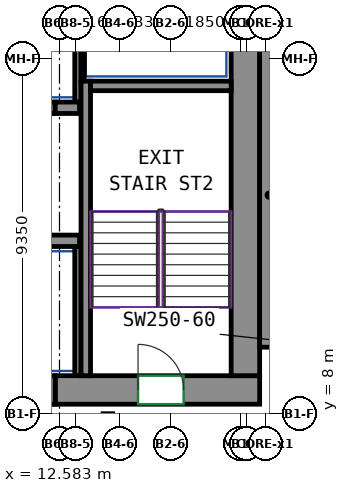
"""IFC4 building model, lengths in metres.
Left out: names, types, materials, properties, quantities, classifications, styles, units other than length and angle.
Written with IfcOpenShell. Run it as: python <this file> out.ifc"""

import sys

from ifc_helpers import new_model, si_unit, direction, frame, frame_2d, origin, place, context, subcontext, project, spatial, rectangle, extrude, source, transform, mapped, element, fill, save


model = new_model("IFC4")
c1 = context("Model", 3, precision=1e-05, world=origin(), true_north=direction((0.0, 1.0)))
c2 = subcontext(c1, "Body", "Model", "MODEL_VIEW")
j1 = project(units=[si_unit("LENGTHUNIT", "METRE"), si_unit("PLANEANGLEUNIT", "RADIAN")], contexts=[c1])
p1 = place(None, origin())
s1 = spatial("IfcSite", under=j1, at=p1, CompositionType="ELEMENT")
p2 = place(p1, origin())
s2 = spatial("IfcBuilding", under=s1, at=p2, CompositionType="ELEMENT")
p3 = place(p2, frame((0.0, 0.0, 199.9)))
s3 = spatial("IfcBuildingStorey", under=s2, at=p3, CompositionType="ELEMENT", Elevation=199.9)
m1 = source(origin(), c2, "Body", "SweptSolid", [
    extrude(rectangle(XDim=5.38, YDim=0.75, at=frame_2d((2.69, 0.0))), origin(), (0.0, 0.0, 1.0), 3.12),
])
p4 = place(p3, frame((12.47, 8.625, 0.0), z_axis=(0.0, 0.0, 1.0), x_axis=(1.0, 0.0, 0.0)))
e1 = element("IfcWall", 1, at=p4, inside=s3, PredefinedType="SHEAR", context=c2, shape_type="MappedRepresentation", body=[
    mapped(m1, transform((0.0, 0.0, 0.0))),
])
p5 = place(p4, frame((2.18, 0.0, 0.0)))
e2 = element("IfcOpeningElement", 2, at=p5, cuts=e1, PredefinedType="OPENING", context=c2, shape_type="SweptSolid", body=[
    extrude(rectangle(XDim=1.2, YDim=2.1, at=frame_2d((0.6, 1.05))), frame((0.0, 0.385, 0.0), z_axis=(0.0, -1.0, 0.0), x_axis=(1.0, 0.0, 0.0)), (0.0, 0.0, 1.0), 0.77),
])
m2 = source(origin(), c2, "Body", "SweptSolid", [
    extrude(rectangle(XDim=12.0, YDim=0.75, at=frame_2d((6.0, 0.0))), origin(), (0.0, 0.0, 1.0), 3.12),
])
p6 = place(p3, frame((17.475, 9.0, 0.0), z_axis=(0.0, 0.0, 1.0), x_axis=(0.0, 1.0, 0.0)))
e3 = element("IfcWall", 3, at=p6, inside=s3, PredefinedType="SHEAR", context=c2, shape_type="MappedRepresentation", body=[
    mapped(m2, transform((0.0, 0.0, 0.0))),
])
m3 = source(origin(), c2, "Body", "SweptSolid", [
    extrude(rectangle(XDim=7.75, YDim=0.25, at=frame_2d((3.875, 0.0))), origin(), (0.0, 0.0, 1.0), 3.12),
])
p7 = place(p3, frame((13.275, 9.0, 0.0), z_axis=(0.0, 0.0, 1.0), x_axis=(0.0, 1.0, 0.0)))
e4 = element("IfcWall", 4, at=p7, inside=s3, PredefinedType="SHEAR", context=c2, shape_type="MappedRepresentation", body=[
    mapped(m3, transform((0.0, 0.0, 0.0))),
])
m4 = source(origin(), c2, "Body", "SweptSolid", [
    extrude(rectangle(XDim=3.7, YDim=0.25, at=frame_2d((1.85, 0.0))), origin(), (0.0, 0.0, 1.0), 3.12),
])
p8 = place(p3, frame((13.4, 16.625, 0.0), z_axis=(0.0, 0.0, 1.0), x_axis=(1.0, 0.0, 0.0)))
e5 = element("IfcWall", 5, at=p8, inside=s3, PredefinedType="SHEAR", context=c2, shape_type="MappedRepresentation", body=[
    mapped(m4, transform((0.0, 0.0, 0.0))),
])
m5 = source(origin(), c2, "Body", "SweptSolid", [
    extrude(rectangle(XDim=8.0, YDim=0.5, at=frame_2d((4.0, 0.0))), origin(), (0.0, 0.0, 1.0), 3.12),
])
p9 = place(p3, frame((18.1, 9.75, 0.0), z_axis=(0.0, 0.0, 1.0), x_axis=(0.0, 1.0, 0.0)))
e6 = element("IfcWall", 6, at=p9, inside=s3, PredefinedType="SHEAR", context=c2, shape_type="MappedRepresentation", body=[
    mapped(m5, transform((0.0, 0.0, 0.0))),
])
m6 = source(origin(), c2, "Body", "SweptSolid", [
    extrude(rectangle(XDim=2.82, YDim=0.3, at=frame_2d((1.41, 0.0))), origin(), (0.0, 0.0, 1.0), 3.12),
])
p10 = place(p3, frame((10.29, 12.55, 0.0), z_axis=(0.0, 0.0, 1.0), x_axis=(1.0, 0.0, 0.0)))
e7 = element("IfcWall", 7, at=p10, inside=s3, PredefinedType="SHEAR", context=c2, shape_type="MappedRepresentation", body=[
    mapped(m6, transform((0.0, 0.0, 0.0))),
])
m7 = source(origin(), c2, "Body", "SweptSolid", [
    extrude(rectangle(XDim=0.64, YDim=0.3, at=frame_2d((0.32, 0.0))), origin(), (0.0, 0.0, 1.0), 3.12),
])
p11 = place(p3, frame((12.47, 16.05, 0.0), z_axis=(0.0, 0.0, 1.0), x_axis=(1.0, 0.0, 0.0)))
e8 = element("IfcWall", 8, at=p11, inside=s3, PredefinedType="SHEAR", context=c2, shape_type="MappedRepresentation", body=[
    mapped(m7, transform((0.0, 0.0, 0.0))),
])
m8 = source(origin(), c2, "Body", "SweptSolid", [
    extrude(rectangle(XDim=1.4, YDim=0.3, at=frame_2d((0.7, 0.0))), origin(), (0.0, 0.0, 1.0), 3.12),
])
p12 = place(p3, frame((11.07, 16.05, 0.0), z_axis=(0.0, 0.0, 1.0), x_axis=(1.0, 0.0, 0.0)))
e9 = element("IfcWall", 9, at=p12, inside=s3, PredefinedType="PARTITIONING", context=c2, shape_type="MappedRepresentation", body=[
    mapped(m8, transform((0.0, 0.0, 0.0))),
])
p13 = place(p12, frame((0.15, 0.0, 0.0)))
e10 = element("IfcOpeningElement", 10, at=p13, cuts=e9, PredefinedType="OPENING", context=c2, shape_type="SweptSolid", body=[
    extrude(rectangle(XDim=1.1, YDim=2.1, at=frame_2d((0.55, 1.05))), frame((0.0, 0.16, 0.0), z_axis=(0.0, -1.0, 0.0), x_axis=(1.0, 0.0, 0.0)), (0.0, 0.0, 1.0), 0.32),
])
m9 = source(origin(), c2, "Body", "SweptSolid", [
    extrude(rectangle(XDim=3.275, YDim=0.165, at=frame_2d((1.638, 0.0))), origin(), (0.0, 0.0, 1.0), 3.12),
])
p14 = place(p3, frame((13.067, 16.2, 0.0), z_axis=(0.0, 0.0, 1.0), x_axis=(0.0, 1.0, 0.0)))
e11 = element("IfcWall", 11, at=p14, inside=s3, PredefinedType="PARTITIONING", context=c2, shape_type="MappedRepresentation", body=[
    mapped(m9, transform((0.0, 0.0, 0.0))),
])
m10 = source(origin(), c2, "Body", "SweptSolid", [
    extrude(rectangle(XDim=2.725, YDim=0.085, at=frame_2d((1.363, 0.0))), origin(), (0.0, 0.0, 1.0), 3.12),
])
p15 = place(p3, frame((13.192, 16.75, 0.0), z_axis=(0.0, 0.0, 1.0), x_axis=(0.0, 1.0, 0.0)))
e12 = element("IfcWall", 12, at=p15, inside=s3, PredefinedType="PARTITIONING", context=c2, shape_type="MappedRepresentation", body=[
    mapped(m10, transform((0.0, 0.0, 0.0))),
])
m11 = source(origin(), c2, "Body", "SweptSolid", [
    extrude(rectangle(XDim=3.4, YDim=0.165, at=frame_2d((1.7, 0.0))), origin(), (0.0, 0.0, 1.0), 3.12),
])
p16 = place(p3, frame((13.067, 9.0, 0.0), z_axis=(0.0, 0.0, 1.0), x_axis=(0.0, 1.0, 0.0)))
e13 = element("IfcWall", 13, at=p16, inside=s3, PredefinedType="PARTITIONING", context=c2, shape_type="MappedRepresentation", body=[
    mapped(m11, transform((0.0, 0.0, 0.0))),
])
m12 = source(origin(), c2, "Body", "SweptSolid", [
    extrude(rectangle(XDim=1.4, YDim=0.75, at=frame_2d((0.7, 0.0))), origin(), (0.0, 0.0, 1.0), 2.7),
])
p17 = place(p3, frame((11.07, 8.625, 0.0), z_axis=(0.0, 0.0, 1.0), x_axis=(1.0, 0.0, 0.0)))
e14 = element("IfcWall", 14, at=p17, inside=s3, PredefinedType="PARTITIONING", context=c2, shape_type="MappedRepresentation", body=[
    mapped(m12, transform((0.0, 0.0, 0.0))),
])
p18 = place(p17, frame((0.25, 0.0, 0.0)))
e15 = element("IfcOpeningElement", 15, at=p18, cuts=e14, PredefinedType="OPENING", context=c2, shape_type="SweptSolid", body=[
    extrude(rectangle(XDim=0.9, YDim=2.1, at=frame_2d((0.45, 1.05))), frame((0.0, 0.385, 0.0), z_axis=(0.0, -1.0, 0.0), x_axis=(1.0, 0.0, 0.0)), (0.0, 0.0, 1.0), 0.77),
])
p19 = place(p5, origin())
e16 = element("IfcDoor", 16, at=p19, inside=s3, OperationType="DOUBLE_DOOR_SINGLE_SWING", PredefinedType="DOOR", context=c2, shape_type="SweptSolid", body=[
    extrude(rectangle(XDim=1.2, YDim=2.1, at=frame_2d((0.6, 1.05))), frame((0.0, 0.28, 0.0), z_axis=(0.0, -1.0, 0.0), x_axis=(1.0, 0.0, 0.0)), (0.0, 0.0, 1.0), 0.05),
])
fill(e2, e16)
save(model, sys.argv[1])
